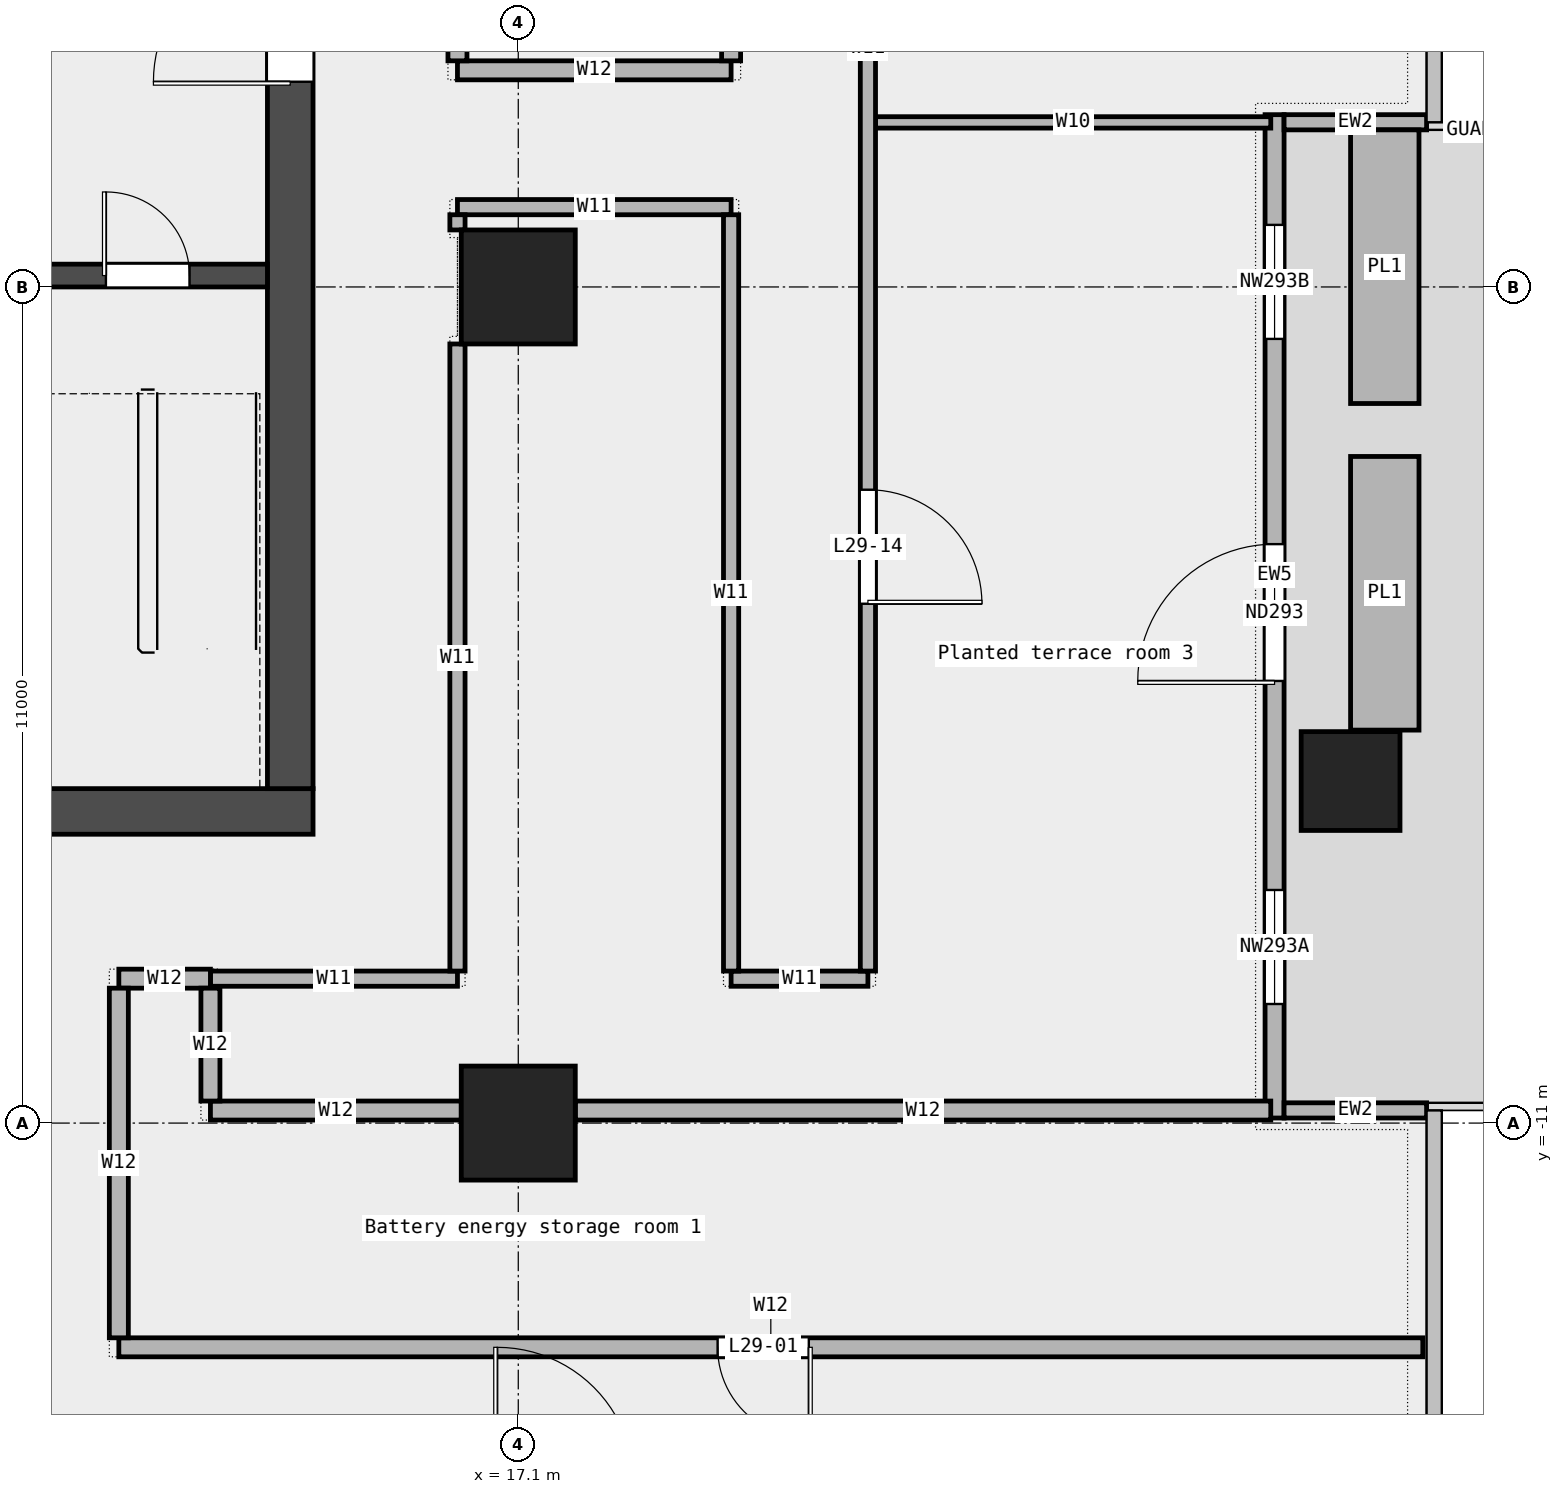
"""IFC4 building model, lengths in metres.
Left out: names, types, materials, properties, quantities, classifications, styles, units other than length and angle.
Written with IfcOpenShell. Run it as: python <this file> out.ifc"""

import sys

from ifc_helpers import new_model, si_unit, direction, frame, frame_2d, origin, origin_2d, place, context, subcontext, project, spatial, rectangle, extrude, element, fill, save


model = new_model("IFC4")
c1 = context("Model", 3, precision=1e-05, world=origin(), true_north=direction((0.0, 1.0)))
c2 = subcontext(c1, "Body", "Model", "MODEL_VIEW")
j1 = project(units=[si_unit("LENGTHUNIT", "METRE"), si_unit("PLANEANGLEUNIT", "RADIAN")], contexts=[c1])
p1 = place(None, origin())
s1 = spatial("IfcSite", under=j1, at=p1, CompositionType="ELEMENT")
p2 = place(p1, origin())
s2 = spatial("IfcBuilding", under=s1, at=p2, CompositionType="ELEMENT")
p3 = place(p2, frame((0.0, 0.0, 144.1)))
s3 = spatial("IfcBuildingStorey", under=s2, at=p3, CompositionType="ELEMENT", Elevation=144.1)
p4 = place(p3, frame((28.05, -6.5, 0.0), z_axis=(0.0, 0.0, 1.0), x_axis=(1.0, 0.0, 0.0)))
e1 = element("IfcColumn", 1, at=p4, inside=s3, PredefinedType="COLUMN", context=c2, shape_type="SweptSolid", body=[
    extrude(rectangle(XDim=1.3, YDim=1.3, at=origin_2d()), origin(), (0.0, 0.0, 1.0), 3.9),
])
for number, where, z_axis, x_axis in (
    (2, (17.1, -11.0, 0.0), (0.0, 0.0, 1.0), (1.0, 0.0, 0.0)),
    (3, (17.1, 0.0, 0.0), (0.0, 0.0, 1.0), (1.0, 0.0, 0.0)),
):
    element("IfcColumn", number, at=place(p3, frame(where, z_axis=z_axis, x_axis=x_axis)), inside=s3, PredefinedType="COLUMN", context=c2, shape_type="SweptSolid", body=[
        extrude(rectangle(XDim=1.5, YDim=1.5, at=origin_2d()), origin(), (0.0, 0.0, 1.0), 3.9),
    ])
p5 = place(p3, frame((27.05, -10.933, 0.0), z_axis=(0.0, 0.0, 1.0), x_axis=(0.0, 1.0, 0.0)))
e4 = element("IfcWall", 4, at=p5, inside=s3, PredefinedType="STANDARD", context=c2, shape_type="SweptSolid", body=[
    extrude(rectangle(XDim=13.2, YDim=0.25, at=frame_2d((6.6, 0.0))), origin(), (0.0, 0.0, 1.0), 3.9),
])
p6 = place(p5, frame((1.5, 0.0, 0.45)))
e5 = element("IfcOpeningElement", 5, at=p6, cuts=e4, PredefinedType="OPENING", context=c2, shape_type="SweptSolid", body=[
    extrude(rectangle(XDim=1.5, YDim=2.4, at=frame_2d((0.75, 1.2))), frame((0.0, 0.137, 0.0), z_axis=(0.0, -1.0, 0.0), x_axis=(1.0, 0.0, 0.0)), (0.0, 0.0, 1.0), 0.274),
])
p7 = place(p5, frame((5.75, 0.0, 0.0)))
e6 = element("IfcOpeningElement", 6, at=p7, cuts=e4, PredefinedType="OPENING", context=c2, shape_type="SweptSolid", body=[
    extrude(rectangle(XDim=1.8, YDim=2.4, at=frame_2d((0.9, 1.2))), frame((0.0, 0.137, 0.0), z_axis=(0.0, -1.0, 0.0), x_axis=(1.0, 0.0, 0.0)), (0.0, 0.0, 1.0), 0.274),
])
p8 = place(p5, frame((10.25, 0.0, 0.45)))
e7 = element("IfcOpeningElement", 7, at=p8, cuts=e4, PredefinedType="OPENING", context=c2, shape_type="SweptSolid", body=[
    extrude(rectangle(XDim=1.5, YDim=2.4, at=frame_2d((0.75, 1.2))), frame((0.0, 0.137, 0.0), z_axis=(0.0, -1.0, 0.0), x_axis=(1.0, 0.0, 0.0)), (0.0, 0.0, 1.0), 0.274),
])
for number, where, z_axis, x_axis in (
    (8, (29.05, -10.833, 0.0), (0.0, 0.0, 1.0), (-1.0, 0.0, 0.0)),
    (9, (29.05, 2.167, 0.0), (0.0, 0.0, 1.0), (-1.0, 0.0, 0.0)),
):
    element("IfcWall", number, at=place(p3, frame(where, z_axis=z_axis, x_axis=x_axis)), inside=s3, PredefinedType="STANDARD", context=c2, shape_type="SweptSolid", body=[
        extrude(rectangle(XDim=1.875, YDim=0.2, at=frame_2d((0.938, 0.0))), origin(), (0.0, 0.0, 1.0), 3.9),
    ])
for number, where, z_axis, x_axis in (
    (10, (28.5, -5.83, 0.0), (0.0, 0.0, 1.0), (0.0, 1.0, 0.0)),
    (11, (28.5, -1.533, 0.0), (0.0, 0.0, 1.0), (0.0, 1.0, 0.0)),
):
    element("IfcWall", number, at=place(p3, frame(where, z_axis=z_axis, x_axis=x_axis)), inside=s3, PredefinedType="STANDARD", context=c2, shape_type="SweptSolid", body=[
        extrude(rectangle(XDim=3.6, YDim=0.9, at=frame_2d((1.8, 0.0))), origin(), (0.0, 0.0, 1.0), 0.7),
    ])
p9 = place(p3, frame((11.845, -13.95, 0.0), z_axis=(0.0, 0.0, 1.0), x_axis=(1.0, 0.0, 0.0)))
e12 = element("IfcWall", 12, at=p9, inside=s3, PredefinedType="PARTITIONING", context=c2, shape_type="SweptSolid", body=[
    extrude(rectangle(XDim=17.155, YDim=0.25, at=frame_2d((8.578, 0.0))), origin(), (0.0, 0.0, 1.0), 3.9),
])
p10 = place(p9, frame((7.877, 0.0, 0.0)))
e13 = element("IfcOpeningElement", 13, at=p10, cuts=e12, PredefinedType="OPENING", context=c2, shape_type="SweptSolid", body=[
    extrude(rectangle(XDim=1.2, YDim=2.1, at=frame_2d((0.6, 1.05))), frame((0.0, 0.137, 0.0), z_axis=(0.0, -1.0, 0.0), x_axis=(1.0, 0.0, 0.0)), (0.0, 0.0, 1.0), 0.274),
])
p11 = place(p3, frame((13.05, -10.835, 0.0), z_axis=(0.0, 0.0, 1.0), x_axis=(1.0, 0.0, 0.0)))
e14 = element("IfcWall", 14, at=p11, inside=s3, PredefinedType="PARTITIONING", context=c2, shape_type="SweptSolid", body=[
    extrude(rectangle(XDim=3.3, YDim=0.25, at=frame_2d((1.65, 0.0))), origin(), (0.0, 0.0, 1.0), 3.9),
])
p12 = place(p3, frame((17.85, -10.835, 0.0), z_axis=(0.0, 0.0, 1.0), x_axis=(1.0, 0.0, 0.0)))
e15 = element("IfcWall", 15, at=p12, inside=s3, PredefinedType="PARTITIONING", context=c2, shape_type="SweptSolid", body=[
    extrude(rectangle(XDim=9.15, YDim=0.25, at=frame_2d((4.575, 0.0))), origin(), (0.0, 0.0, 1.0), 3.9),
])
p13 = place(p3, frame((13.05, -9.1, 0.0), z_axis=(0.0, 0.0, 1.0), x_axis=(1.0, 0.0, 0.0)))
e16 = element("IfcWall", 16, at=p13, inside=s3, PredefinedType="PARTITIONING", context=c2, shape_type="SweptSolid", body=[
    extrude(rectangle(XDim=3.25, YDim=0.2, at=frame_2d((1.625, 0.0))), origin(), (0.0, 0.0, 1.0), 3.9),
])
p14 = place(p3, frame((19.9, -9.1, 0.0), z_axis=(0.0, 0.0, 1.0), x_axis=(1.0, 0.0, 0.0)))
e17 = element("IfcWall", 17, at=p14, inside=s3, PredefinedType="PARTITIONING", context=c2, shape_type="SweptSolid", body=[
    extrude(rectangle(XDim=1.8, YDim=0.2, at=frame_2d((0.9, 0.0))), origin(), (0.0, 0.0, 1.0), 3.9),
])
p15 = place(p3, frame((11.845, -9.1, 0.0), z_axis=(0.0, 0.0, 1.0), x_axis=(1.0, 0.0, 0.0)))
e18 = element("IfcWall", 18, at=p15, inside=s3, PredefinedType="PARTITIONING", context=c2, shape_type="SweptSolid", body=[
    extrude(rectangle(XDim=1.205, YDim=0.25, at=frame_2d((0.603, 0.0))), origin(), (0.0, 0.0, 1.0), 3.9),
])
p16 = place(p3, frame((16.3, 1.05, 0.0), z_axis=(0.0, 0.0, 1.0), x_axis=(1.0, 0.0, 0.0)))
e19 = element("IfcWall", 19, at=p16, inside=s3, PredefinedType="PARTITIONING", context=c2, shape_type="SweptSolid", body=[
    extrude(rectangle(XDim=3.6, YDim=0.2, at=frame_2d((1.8, 0.0))), origin(), (0.0, 0.0, 1.0), 3.9),
])
p17 = place(p3, frame((21.8, 2.165, 0.0), z_axis=(0.0, 0.0, 1.0), x_axis=(1.0, 0.0, 0.0)))
e20 = element("IfcWall", 20, at=p17, inside=s3, PredefinedType="PARTITIONING", context=c2, shape_type="SweptSolid", body=[
    extrude(rectangle(XDim=5.2, YDim=0.15, at=frame_2d((2.6, 0.0))), origin(), (0.0, 0.0, 1.0), 3.9),
])
p18 = place(p3, frame((16.3, 2.85, 0.0), z_axis=(0.0, 0.0, 1.0), x_axis=(1.0, 0.0, 0.0)))
e21 = element("IfcWall", 21, at=p18, inside=s3, PredefinedType="PARTITIONING", context=c2, shape_type="SweptSolid", body=[
    extrude(rectangle(XDim=3.6, YDim=0.25, at=frame_2d((1.8, 0.0))), origin(), (0.0, 0.0, 1.0), 3.9),
])
p19 = place(p3, frame((11.845, -13.825, 0.0), z_axis=(0.0, 0.0, 1.0), x_axis=(0.0, 1.0, 0.0)))
e22 = element("IfcWall", 22, at=p19, inside=s3, PredefinedType="PARTITIONING", context=c2, shape_type="SweptSolid", body=[
    extrude(rectangle(XDim=4.6, YDim=0.25, at=frame_2d((2.3, 0.0))), origin(), (0.0, 0.0, 1.0), 3.9),
])
p20 = place(p3, frame((13.05, -10.71, 0.0), z_axis=(0.0, 0.0, 1.0), x_axis=(0.0, 1.0, 0.0)))
e23 = element("IfcWall", 23, at=p20, inside=s3, PredefinedType="PARTITIONING", context=c2, shape_type="SweptSolid", body=[
    extrude(rectangle(XDim=1.485, YDim=0.25, at=frame_2d((0.742, 0.0))), origin(), (0.0, 0.0, 1.0), 3.9),
])
p21 = place(p3, frame((16.3, -9.0, 0.0), z_axis=(0.0, 0.0, 1.0), x_axis=(0.0, 1.0, 0.0)))
e24 = element("IfcWall", 24, at=p21, inside=s3, PredefinedType="PARTITIONING", context=c2, shape_type="SweptSolid", body=[
    extrude(rectangle(XDim=8.25, YDim=0.2, at=frame_2d((4.125, 0.0))), origin(), (0.0, 0.0, 1.0), 3.9),
])
p22 = place(p3, frame((16.3, 0.75, 0.0), z_axis=(0.0, 0.0, 1.0), x_axis=(0.0, 1.0, 0.0)))
e25 = element("IfcWall", 25, at=p22, inside=s3, PredefinedType="PARTITIONING", context=c2, shape_type="SweptSolid", body=[
    extrude(rectangle(XDim=0.2, YDim=0.2, at=frame_2d((0.1, 0.0))), origin(), (0.0, 0.0, 1.0), 3.9),
])
p23 = place(p3, frame((16.3, 2.975, 0.0), z_axis=(0.0, 0.0, 1.0), x_axis=(0.0, 1.0, 0.0)))
e26 = element("IfcWall", 26, at=p23, inside=s3, PredefinedType="PARTITIONING", context=c2, shape_type="SweptSolid", body=[
    extrude(rectangle(XDim=7.275, YDim=0.25, at=frame_2d((3.637, 0.0))), origin(), (0.0, 0.0, 1.0), 3.9),
])
p24 = place(p3, frame((19.9, -9.0, 0.0), z_axis=(0.0, 0.0, 1.0), x_axis=(0.0, 1.0, 0.0)))
e27 = element("IfcWall", 27, at=p24, inside=s3, PredefinedType="PARTITIONING", context=c2, shape_type="SweptSolid", body=[
    extrude(rectangle(XDim=9.95, YDim=0.2, at=frame_2d((4.975, 0.0))), origin(), (0.0, 0.0, 1.0), 3.9),
])
p25 = place(p3, frame((19.9, 2.975, 0.0), z_axis=(0.0, 0.0, 1.0), x_axis=(0.0, 1.0, 0.0)))
e28 = element("IfcWall", 28, at=p25, inside=s3, PredefinedType="PARTITIONING", context=c2, shape_type="SweptSolid", body=[
    extrude(rectangle(XDim=12.3, YDim=0.25, at=frame_2d((6.15, 0.0))), origin(), (0.0, 0.0, 1.0), 3.9),
])
p26 = place(p25, frame((8.775, 0.0, 0.0)))
e29 = element("IfcOpeningElement", 29, at=p26, cuts=e28, PredefinedType="OPENING", context=c2, shape_type="SweptSolid", body=[
    extrude(rectangle(XDim=0.9, YDim=2.1, at=frame_2d((0.45, 1.05))), frame((0.0, 0.137, 0.0), z_axis=(0.0, -1.0, 0.0), x_axis=(1.0, 0.0, 0.0)), (0.0, 0.0, 1.0), 0.274),
])
p27 = place(p25, frame((2.625, 0.0, 0.0)))
e30 = element("IfcOpeningElement", 30, at=p27, cuts=e28, PredefinedType="OPENING", context=c2, shape_type="SweptSolid", body=[
    extrude(rectangle(XDim=0.9, YDim=2.1, at=frame_2d((0.45, 1.05))), frame((0.0, 0.137, 0.0), z_axis=(0.0, -1.0, 0.0), x_axis=(1.0, 0.0, 0.0)), (0.0, 0.0, 1.0), 0.274),
])
p28 = place(p3, frame((21.7, -9.0, 0.0), z_axis=(0.0, 0.0, 1.0), x_axis=(0.0, 1.0, 0.0)))
e31 = element("IfcWall", 31, at=p28, inside=s3, PredefinedType="PARTITIONING", context=c2, shape_type="SweptSolid", body=[
    extrude(rectangle(XDim=24.3, YDim=0.2, at=frame_2d((12.15, 0.0))), origin(), (0.0, 0.0, 1.0), 3.9),
])
p29 = place(p28, frame((18.645, 0.0, 0.0)))
e32 = element("IfcOpeningElement", 32, at=p29, cuts=e31, PredefinedType="OPENING", context=c2, shape_type="SweptSolid", body=[
    extrude(rectangle(XDim=1.2, YDim=2.1, at=frame_2d((0.6, 1.05))), frame((0.0, 0.112, 0.0), z_axis=(0.0, -1.0, 0.0), x_axis=(1.0, 0.0, 0.0)), (0.0, 0.0, 1.0), 0.224),
])
p30 = place(p28, frame((4.833, 0.0, 0.0)))
e33 = element("IfcOpeningElement", 33, at=p30, cuts=e31, PredefinedType="OPENING", context=c2, shape_type="SweptSolid", body=[
    extrude(rectangle(XDim=1.5, YDim=2.1, at=frame_2d((0.75, 1.05))), frame((0.0, 0.112, 0.0), z_axis=(0.0, -1.0, 0.0), x_axis=(1.0, 0.0, 0.0)), (0.0, 0.0, 1.0), 0.224),
])
p31 = place(p28, frame((12.228, 0.0, 0.0)))
e34 = element("IfcOpeningElement", 34, at=p31, cuts=e31, PredefinedType="OPENING", context=c2, shape_type="SweptSolid", body=[
    extrude(rectangle(XDim=0.9, YDim=2.1, at=frame_2d((0.45, 1.05))), frame((0.0, 0.112, 0.0), z_axis=(0.0, -1.0, 0.0), x_axis=(1.0, 0.0, 0.0)), (0.0, 0.0, 1.0), 0.224),
])
p32 = place(p3, frame((-14.4, -6.9, 0.0), z_axis=(0.0, 0.0, 1.0), x_axis=(1.0, 0.0, 0.0)))
e35 = element("IfcWall", 35, at=p32, inside=s3, PredefinedType="SHEAR", context=c2, shape_type="SweptSolid", body=[
    extrude(rectangle(XDim=28.8, YDim=0.6, at=frame_2d((14.4, 0.0))), origin(), (0.0, 0.0, 1.0), 4.2),
])
p33 = place(p32, frame((4.9, 0.0, 0.0)))
e36 = element("IfcOpeningElement", 36, at=p33, cuts=e35, PredefinedType="OPENING", context=c2, shape_type="SweptSolid", body=[
    extrude(rectangle(XDim=1.0, YDim=2.1, at=frame_2d((0.5, 1.05))), frame((0.0, 0.312, 0.0), z_axis=(0.0, -1.0, 0.0), x_axis=(1.0, 0.0, 0.0)), (0.0, 0.0, 1.0), 0.624),
])
p34 = place(p32, frame((9.3, 0.0, 0.0)))
e37 = element("IfcOpeningElement", 37, at=p34, cuts=e35, PredefinedType="OPENING", context=c2, shape_type="SweptSolid", body=[
    extrude(rectangle(XDim=1.2, YDim=2.1, at=frame_2d((0.6, 1.05))), frame((0.0, 0.312, 0.0), z_axis=(0.0, -1.0, 0.0), x_axis=(1.0, 0.0, 0.0)), (0.0, 0.0, 1.0), 0.624),
])
p35 = place(p32, frame((14.462, 0.0, 0.0)))
e38 = element("IfcOpeningElement", 38, at=p35, cuts=e35, PredefinedType="OPENING", context=c2, shape_type="SweptSolid", body=[
    extrude(rectangle(XDim=1.0, YDim=2.1, at=frame_2d((0.5, 1.05))), frame((0.0, 0.312, 0.0), z_axis=(0.0, -1.0, 0.0), x_axis=(1.0, 0.0, 0.0)), (0.0, 0.0, 1.0), 0.624),
])
p36 = place(p32, frame((18.75, 0.0, 0.0)))
e39 = element("IfcOpeningElement", 39, at=p36, cuts=e35, PredefinedType="OPENING", context=c2, shape_type="SweptSolid", body=[
    extrude(rectangle(XDim=1.8, YDim=2.1, at=frame_2d((0.9, 1.05))), frame((0.0, 0.312, 0.0), z_axis=(0.0, -1.0, 0.0), x_axis=(1.0, 0.0, 0.0)), (0.0, 0.0, 1.0), 0.624),
])
p37 = place(p32, frame((23.087, 0.0, 0.0)))
e40 = element("IfcOpeningElement", 40, at=p37, cuts=e35, PredefinedType="OPENING", context=c2, shape_type="SweptSolid", body=[
    extrude(rectangle(XDim=1.0, YDim=2.1, at=frame_2d((0.5, 1.05))), frame((0.0, 0.312, 0.0), z_axis=(0.0, -1.0, 0.0), x_axis=(1.0, 0.0, 0.0)), (0.0, 0.0, 1.0), 0.624),
])
p38 = place(p3, frame((14.1, -6.6, 0.0), z_axis=(0.0, 0.0, 1.0), x_axis=(0.0, 1.0, 0.0)))
e41 = element("IfcWall", 41, at=p38, inside=s3, PredefinedType="SHEAR", context=c2, shape_type="SweptSolid", body=[
    extrude(rectangle(XDim=19.5, YDim=0.6, at=frame_2d((9.75, 0.0))), origin(), (0.0, 0.0, 1.0), 4.2),
])
p39 = place(p38, frame((9.3, 0.0, 0.0)))
e42 = element("IfcOpeningElement", 42, at=p39, cuts=e41, PredefinedType="OPENING", context=c2, shape_type="SweptSolid", body=[
    extrude(rectangle(XDim=1.8, YDim=2.1, at=frame_2d((0.9, 1.05))), frame((0.0, 0.312, 0.0), z_axis=(0.0, -1.0, 0.0), x_axis=(1.0, 0.0, 0.0)), (0.0, 0.0, 1.0), 0.624),
])
p40 = place(p3, frame((10.65, 0.15, 0.0), z_axis=(0.0, 0.0, 1.0), x_axis=(1.0, 0.0, 0.0)))
e43 = element("IfcWall", 43, at=p40, inside=s3, PredefinedType="SOLIDWALL", context=c2, shape_type="SweptSolid", body=[
    extrude(rectangle(XDim=3.15, YDim=0.3, at=frame_2d((1.575, 0.0))), origin(), (0.0, 0.0, 1.0), 4.2),
])
p41 = place(p40, frame((1.025, 0.0, 0.0)))
e44 = element("IfcOpeningElement", 44, at=p41, cuts=e43, PredefinedType="OPENING", context=c2, shape_type="SweptSolid", body=[
    extrude(rectangle(XDim=1.1, YDim=2.1, at=frame_2d((0.55, 1.05))), frame((0.0, 0.162, 0.0), z_axis=(0.0, -1.0, 0.0), x_axis=(1.0, 0.0, 0.0)), (0.0, 0.0, 1.0), 0.324),
])
p42 = place(p6, origin())
e45 = element("IfcWindow", 45, at=p42, inside=s3, PartitioningType="SINGLE_PANEL", PredefinedType="WINDOW", context=c2, shape_type="SweptSolid", body=[
    extrude(rectangle(XDim=1.5, YDim=2.4, at=frame_2d((0.75, 1.2))), frame((0.0, 0.03, 0.0), z_axis=(0.0, -1.0, 0.0), x_axis=(1.0, 0.0, 0.0)), (0.0, 0.0, 1.0), 0.06),
])
fill(e5, e45)
p43 = place(p7, origin())
e46 = element("IfcDoor", 46, at=p43, inside=s3, OperationType="DOUBLE_DOOR_SINGLE_SWING", PredefinedType="DOOR", context=c2, shape_type="SweptSolid", body=[
    extrude(rectangle(XDim=1.8, YDim=2.4, at=frame_2d((0.9, 1.2))), frame((0.0, 0.025, 0.0), z_axis=(0.0, -1.0, 0.0), x_axis=(1.0, 0.0, 0.0)), (0.0, 0.0, 1.0), 0.05),
])
fill(e6, e46)
p44 = place(p8, origin())
e47 = element("IfcWindow", 47, at=p44, inside=s3, PartitioningType="SINGLE_PANEL", PredefinedType="WINDOW", context=c2, shape_type="SweptSolid", body=[
    extrude(rectangle(XDim=1.5, YDim=2.4, at=frame_2d((0.75, 1.2))), frame((0.0, 0.03, 0.0), z_axis=(0.0, -1.0, 0.0), x_axis=(1.0, 0.0, 0.0)), (0.0, 0.0, 1.0), 0.06),
])
fill(e7, e47)
p45 = place(p10, origin())
e48 = element("IfcDoor", 48, at=p45, inside=s3, OperationType="SINGLE_SWING_LEFT", PredefinedType="DOOR", context=c2, shape_type="SweptSolid", body=[
    extrude(rectangle(XDim=1.2, YDim=2.1, at=frame_2d((0.6, 1.05))), frame((0.0, 0.025, 0.0), z_axis=(0.0, -1.0, 0.0), x_axis=(1.0, 0.0, 0.0)), (0.0, 0.0, 1.0), 0.05),
])
fill(e13, e48)
p46 = place(p30, origin())
e49 = element("IfcDoor", 49, at=p46, inside=s3, OperationType="DOUBLE_DOOR_SINGLE_SWING", PredefinedType="DOOR", context=c2, shape_type="SweptSolid", body=[
    extrude(rectangle(XDim=1.5, YDim=2.1, at=frame_2d((0.75, 1.05))), frame((0.0, 0.025, 0.0), z_axis=(0.0, -1.0, 0.0), x_axis=(1.0, 0.0, 0.0)), (0.0, 0.0, 1.0), 0.05),
])
fill(e33, e49)
p47 = place(p41, origin())
e50 = element("IfcDoor", 50, at=p47, inside=s3, OperationType="SINGLE_SWING_RIGHT", PredefinedType="DOOR", context=c2, shape_type="SweptSolid", body=[
    extrude(rectangle(XDim=1.1, YDim=2.1, at=frame_2d((0.55, 1.05))), frame((0.0, 0.025, 0.0), z_axis=(0.0, -1.0, 0.0), x_axis=(1.0, 0.0, 0.0)), (0.0, 0.0, 1.0), 0.05),
])
fill(e44, e50)
p48 = place(p39, origin())
e51 = element("IfcDoor", 51, at=p48, inside=s3, OperationType="DOUBLE_DOOR_SINGLE_SWING", PredefinedType="DOOR", context=c2, shape_type="SweptSolid", body=[
    extrude(rectangle(XDim=1.8, YDim=2.1, at=frame_2d((0.9, 1.05))), frame((0.0, 0.025, 0.0), z_axis=(0.0, -1.0, 0.0), x_axis=(1.0, 0.0, 0.0)), (0.0, 0.0, 1.0), 0.05),
])
fill(e42, e51)
save(model, sys.argv[1])
